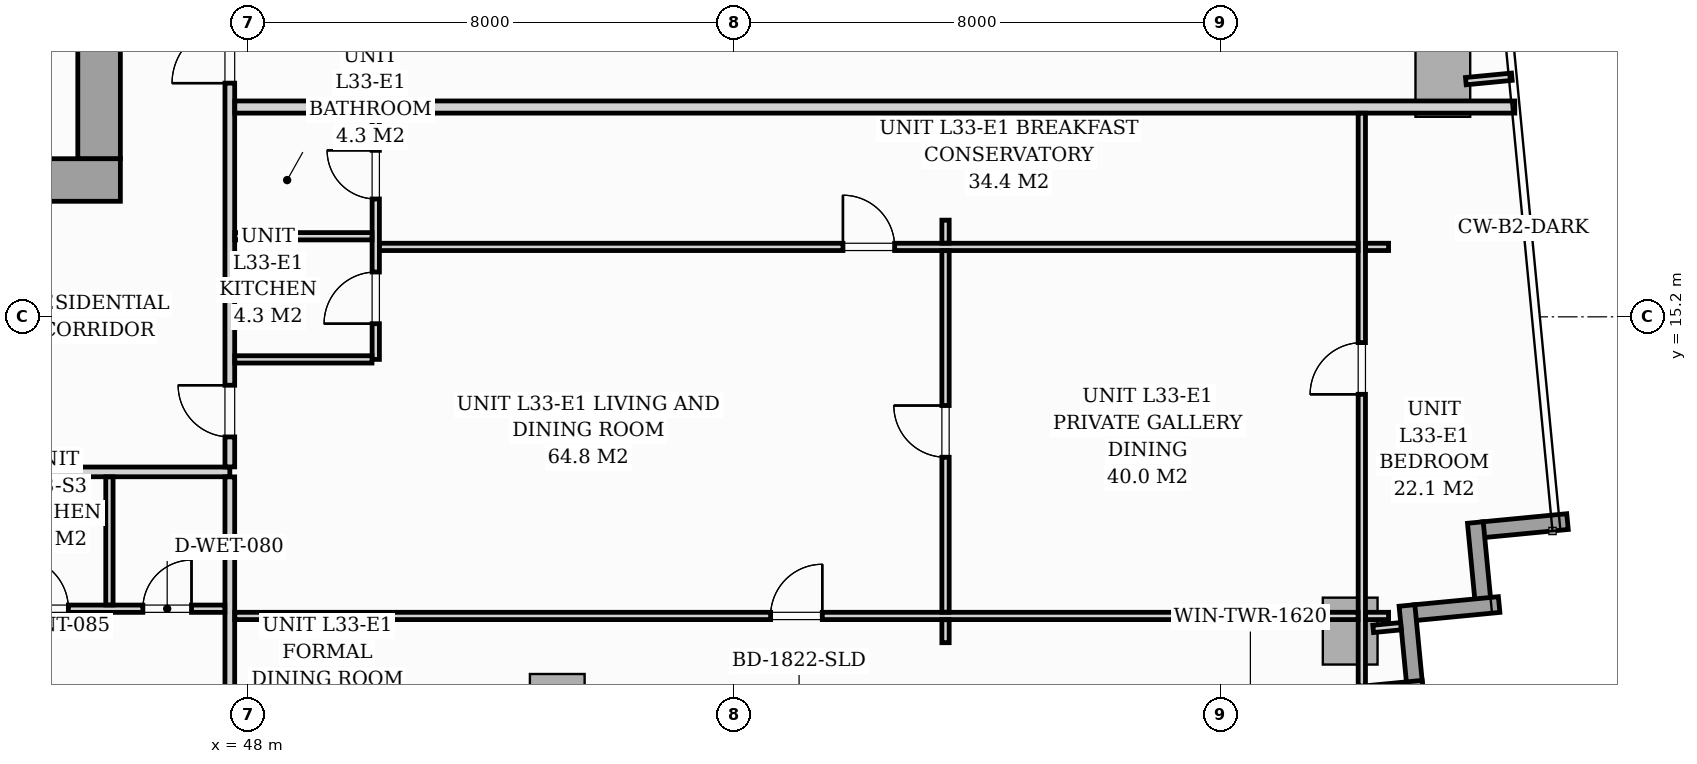
"""IFC4 building model, lengths in metres.
Left out: names, types, materials, properties, quantities, classifications, styles, units other than length and angle.
Written with IfcOpenShell. Run it as: python <this file> out.ifc"""

import sys

from ifc_helpers import new_model, si_unit, direction, frame, frame_2d, origin, origin_2d, place, context, subcontext, project, spatial, rectangle, i_section, extrude, source, transform, mapped, element, fill, save


model = new_model("IFC4")
c1 = context("Model", 3, precision=1e-05, world=origin(), true_north=direction((0.0, 1.0)))
c2 = subcontext(c1, "Body", "Model", "MODEL_VIEW")
j1 = project(units=[si_unit("LENGTHUNIT", "METRE"), si_unit("PLANEANGLEUNIT", "RADIAN")], contexts=[c1])
p1 = place(None, origin())
s1 = spatial("IfcSite", under=j1, at=p1, CompositionType="ELEMENT")
p2 = place(p1, origin())
s2 = spatial("IfcBuilding", under=s1, at=p2, CompositionType="ELEMENT")
p3 = place(p2, frame((0.0, 0.0, 116.2)))
s3 = spatial("IfcBuildingStorey", under=s2, at=p3, CompositionType="ELEMENT", Elevation=116.2)
m1 = source(origin(), c2, "Body", "SweptSolid", [
    extrude(i_section(OverallWidth=0.427, OverallDepth=0.483, WebThickness=0.051, FlangeThickness=0.082, FilletRadius=0.018, at=origin_2d()), origin(), (0.0, 0.0, 1.0), 3.196),
])
p4 = place(p3, frame((45.6, 17.4, 0.002), z_axis=(0.0, 0.0, 1.0), x_axis=(1.0, 0.0, 0.0)))
e1 = element("IfcColumn", 1, at=p4, inside=s3, PredefinedType="PILASTER", context=c2, shape_type="MappedRepresentation", body=[
    mapped(m1, transform((0.0, 0.0, 0.0), scale=1.0)),
])
m2 = source(origin(), c2, "Body", "SweptSolid", [
    extrude(rectangle(XDim=0.9, YDim=1.1, at=origin_2d()), origin(), (0.0, 0.0, 1.0), 3.194),
])
for number, where, z_axis, x_axis in (
    (2, (53.085, 8.776, 0.002), (0.0, 0.0, 1.0), (0.995, 0.096, 0.0)),
    (3, (66.125, 10.032, 0.002), (0.0, 0.0, 1.0), (0.995, 0.096, 0.0)),
    (4, (67.648, 19.039, 0.002), (0.0, 0.0, 1.0), (0.995, 0.096, 0.0)),
):
    element("IfcColumn", number, at=place(p3, frame(where, z_axis=z_axis, x_axis=x_axis)), inside=s3, PredefinedType="COLUMN", context=c2, shape_type="MappedRepresentation", body=[
        mapped(m2, transform((0.0, 0.0, 0.0), scale=1.0)),
    ])
for number, where, z_axis, x_axis in (
    (5, (69.698, 11.833, 0.0), (0.0, 0.0, 1.0), (-0.995, -0.096, 0.0)),
    (6, (68.183, 11.817, 0.0), (0.0, 0.0, 1.0), (0.096, -0.995, 0.0)),
):
    element("IfcWall", number, at=place(p3, frame(where, z_axis=z_axis, x_axis=x_axis)), inside=s3, PredefinedType="STANDARD", context=c2, shape_type="SweptSolid", body=[
        extrude(rectangle(XDim=1.395, YDim=0.26, at=frame_2d((0.697, 0.0))), origin(), (0.0, 0.0, 1.0), 2.9),
    ])
p5 = place(p3, frame((68.574, 10.469, 0.0), z_axis=(0.0, 0.0, 1.0), x_axis=(-0.99540774648, -0.095725744959, 0.0)))
e7 = element("IfcWall", 7, at=p5, inside=s3, PredefinedType="STANDARD", context=c2, shape_type="SweptSolid", body=[
    extrude(rectangle(XDim=1.395, YDim=0.26, at=frame_2d((0.698, 0.0))), origin(), (0.0, 0.0, 1.0), 2.9),
])
p6 = place(p3, frame((67.059, 10.453, 0.0), z_axis=(0.0, 0.0, 1.0), x_axis=(0.095915846097, -0.995389446633, 0.0)))
e8 = element("IfcWall", 8, at=p6, inside=s3, PredefinedType="STANDARD", context=c2, shape_type="SweptSolid", body=[
    extrude(rectangle(XDim=1.395, YDim=0.26, at=frame_2d((0.697, 0.0))), origin(), (0.0, 0.0, 1.0), 2.9),
])
p7 = place(p3, frame((67.32, 9.092, 0.0), z_axis=(0.0, 0.0, 1.0), x_axis=(-0.995396521236, -0.095842399342, 0.0)))
e9 = element("IfcWall", 9, at=p7, inside=s3, PredefinedType="STANDARD", context=c2, shape_type="SweptSolid", body=[
    extrude(rectangle(XDim=19.11, YDim=0.26, at=frame_2d((9.555, 0.0))), origin(), (0.0, 0.0, 1.0), 2.9),
])
p8 = place(p7, frame((9.406, 0.0, 0.0)))
e10 = element("IfcOpeningElement", 10, at=p8, cuts=e9, PredefinedType="OPENING", context=c2, shape_type="SweptSolid", body=[
    extrude(rectangle(XDim=1.8, YDim=2.06, at=frame_2d((0.9, 1.03))), frame((0.0, 0.14, 0.0), z_axis=(0.0, -1.0, 0.0), x_axis=(1.0, 0.0, 0.0)), (0.0, 0.0, 1.0), 0.28),
])
p9 = place(p7, frame((2.05, 0.0, 0.65)))
e11 = element("IfcOpeningElement", 11, at=p9, cuts=e9, PredefinedType="OPENING", context=c2, shape_type="SweptSolid", body=[
    extrude(rectangle(XDim=1.6, YDim=1.5, at=frame_2d((0.8, 0.75))), frame((0.0, 0.14, 0.0), z_axis=(0.0, -1.0, 0.0), x_axis=(1.0, 0.0, 0.0)), (0.0, 0.0, 1.0), 0.28),
])
p10 = place(p3, frame((26.1, 17.45, 0.0), z_axis=(0.0, 0.0, 1.0), x_axis=(1.0, 0.0, 0.0)))
e12 = element("IfcWall", 12, at=p10, inside=s3, PredefinedType="SHEAR", context=c2, shape_type="SweptSolid", body=[
    extrude(rectangle(XDim=19.8, YDim=0.7, at=frame_2d((9.9, 0.0))), origin(), (0.0, 0.0, 1.0), 3.2),
])
p11 = place(p10, frame((1.05, 0.0, 0.0)))
e13 = element("IfcOpeningElement", 13, at=p11, cuts=e12, PredefinedType="OPENING", context=c2, shape_type="SweptSolid", body=[
    extrude(rectangle(XDim=0.95, YDim=2.06, at=frame_2d((0.475, 1.03))), frame((0.0, 0.36, 0.0), z_axis=(0.0, -1.0, 0.0), x_axis=(1.0, 0.0, 0.0)), (0.0, 0.0, 1.0), 0.72),
])
p12 = place(p10, frame((9.48, 0.0, 0.0)))
e14 = element("IfcOpeningElement", 14, at=p12, cuts=e12, PredefinedType="OPENING", context=c2, shape_type="SweptSolid", body=[
    extrude(rectangle(XDim=0.85, YDim=2.0, at=frame_2d((0.425, 1.0))), frame((0.0, 0.36, 0.0), z_axis=(0.0, -1.0, 0.0), x_axis=(1.0, 0.0, 0.0)), (0.0, 0.0, 1.0), 0.72),
])
p13 = place(p10, frame((17.65, 0.0, 0.0)))
e15 = element("IfcOpeningElement", 15, at=p13, cuts=e12, PredefinedType="OPENING", context=c2, shape_type="SweptSolid", body=[
    extrude(rectangle(XDim=0.95, YDim=2.06, at=frame_2d((0.475, 1.03))), frame((0.0, 0.36, 0.0), z_axis=(0.0, -1.0, 0.0), x_axis=(1.0, 0.0, 0.0)), (0.0, 0.0, 1.0), 0.72),
])
p14 = place(p3, frame((45.55, 17.802, 0.0), z_axis=(0.0, 0.0, 1.0), x_axis=(0.0, 1.0, 0.0)))
e16 = element("IfcWall", 16, at=p14, inside=s3, PredefinedType="SHEAR", context=c2, shape_type="SweptSolid", body=[
    extrude(rectangle(XDim=5.796, YDim=0.7, at=frame_2d((2.898, 0.0))), origin(), (0.0, 0.0, 1.0), 3.2),
])
p15 = place(p3, frame((21.5, 12.65, 0.0), z_axis=(0.0, 0.0, 1.0), x_axis=(1.0, 0.0, 0.0)))
e17 = element("IfcWall", 17, at=p15, inside=s3, PredefinedType="PARTITIONING", context=c2, shape_type="SweptSolid", body=[
    extrude(rectangle(XDim=26.2, YDim=0.16, at=frame_2d((13.1, 0.0))), origin(), (0.0, 0.0, 1.0), 2.9),
])
p16 = place(p15, frame((5.927, 0.0, 0.0)))
e18 = element("IfcOpeningElement", 18, at=p16, cuts=e17, PredefinedType="OPENING", context=c2, shape_type="SweptSolid", body=[
    extrude(rectangle(XDim=0.95, YDim=2.06, at=frame_2d((0.475, 1.03))), frame((0.0, 0.09, 0.0), z_axis=(0.0, -1.0, 0.0), x_axis=(1.0, 0.0, 0.0)), (0.0, 0.0, 1.0), 0.18),
])
p17 = place(p15, frame((10.575, 0.0, 0.0)))
e19 = element("IfcOpeningElement", 19, at=p17, cuts=e17, PredefinedType="OPENING", context=c2, shape_type="SweptSolid", body=[
    extrude(rectangle(XDim=0.95, YDim=2.06, at=frame_2d((0.475, 1.03))), frame((0.0, 0.09, 0.0), z_axis=(0.0, -1.0, 0.0), x_axis=(1.0, 0.0, 0.0)), (0.0, 0.0, 1.0), 0.18),
])
p18 = place(p15, frame((19.322, 0.0, 0.0)))
e20 = element("IfcOpeningElement", 20, at=p18, cuts=e17, PredefinedType="OPENING", context=c2, shape_type="SweptSolid", body=[
    extrude(rectangle(XDim=0.95, YDim=2.06, at=frame_2d((0.475, 1.03))), frame((0.0, 0.09, 0.0), z_axis=(0.0, -1.0, 0.0), x_axis=(1.0, 0.0, 0.0)), (0.0, 0.0, 1.0), 0.18),
])
p19 = place(p3, frame((47.7, 7.153, 0.0), z_axis=(0.0, 0.0, 1.0), x_axis=(0.0, 1.0, 0.0)))
e21 = element("IfcWall", 21, at=p19, inside=s3, PredefinedType="PARTITIONING", context=c2, shape_type="SweptSolid", body=[
    extrude(rectangle(XDim=5.416, YDim=0.16, at=frame_2d((2.708, 0.0))), origin(), (0.0, 0.0, 1.0), 2.9),
])
p20 = place(p3, frame((47.7, 12.732, 0.0), z_axis=(0.0, 0.0, 1.0), x_axis=(0.0, 1.0, 0.0)))
e22 = element("IfcWall", 22, at=p20, inside=s3, PredefinedType="PARTITIONING", context=c2, shape_type="SweptSolid", body=[
    extrude(rectangle(XDim=7.918, YDim=0.16, at=frame_2d((3.959, 0.0))), origin(), (0.0, 0.0, 1.0), 2.9),
])
p21 = place(p20, frame((0.493, 0.0, 0.0)))
e23 = element("IfcOpeningElement", 23, at=p21, cuts=e22, PredefinedType="OPENING", context=c2, shape_type="SweptSolid", body=[
    extrude(rectangle(XDim=0.85, YDim=2.0, at=frame_2d((0.425, 1.0))), frame((0.0, 0.09, 0.0), z_axis=(0.0, -1.0, 0.0), x_axis=(1.0, 0.0, 0.0)), (0.0, 0.0, 1.0), 0.18),
])
p22 = place(p20, frame((6.311, 0.0, 0.0)))
e24 = element("IfcOpeningElement", 24, at=p22, cuts=e22, PredefinedType="OPENING", context=c2, shape_type="SweptSolid", body=[
    extrude(rectangle(XDim=0.95, YDim=2.06, at=frame_2d((0.475, 1.03))), frame((0.0, 0.09, 0.0), z_axis=(0.0, -1.0, 0.0), x_axis=(1.0, 0.0, 0.0)), (0.0, 0.0, 1.0), 0.18),
])
p23 = place(p3, frame((43.52, 10.4, 0.0), z_axis=(0.0, 0.0, 1.0), x_axis=(1.0, 0.0, 0.0)))
e25 = element("IfcWall", 25, at=p23, inside=s3, PredefinedType="PARTITIONING", context=c2, shape_type="SweptSolid", body=[
    extrude(rectangle(XDim=4.098, YDim=0.12, at=frame_2d((2.049, 0.0))), origin(), (0.0, 0.0, 1.0), 2.9),
])
p24 = place(p23, frame((0.675, 0.0, 0.0)))
e26 = element("IfcOpeningElement", 26, at=p24, cuts=e25, PredefinedType="OPENING", context=c2, shape_type="SweptSolid", body=[
    extrude(rectangle(XDim=0.85, YDim=2.05, at=frame_2d((0.425, 1.025))), frame((0.0, 0.07, 0.0), z_axis=(0.0, -1.0, 0.0), x_axis=(1.0, 0.0, 0.0)), (0.0, 0.0, 1.0), 0.14),
])
p25 = place(p23, frame((2.75, 0.0, 0.0)))
e27 = element("IfcOpeningElement", 27, at=p25, cuts=e25, PredefinedType="OPENING", context=c2, shape_type="SweptSolid", body=[
    extrude(rectangle(XDim=0.8, YDim=2.02, at=frame_2d((0.4, 1.01))), frame((0.0, 0.07, 0.0), z_axis=(0.0, -1.0, 0.0), x_axis=(1.0, 0.0, 0.0)), (0.0, 0.0, 1.0), 0.14),
])
p26 = place(p3, frame((45.72, 10.462, 0.0), z_axis=(0.0, 0.0, 1.0), x_axis=(0.0, 1.0, 0.0)))
e28 = element("IfcWall", 28, at=p26, inside=s3, PredefinedType="PARTITIONING", context=c2, shape_type="SweptSolid", body=[
    extrude(rectangle(XDim=2.106, YDim=0.12, at=frame_2d((1.053, 0.0))), origin(), (0.0, 0.0, 1.0), 2.9),
])
p27 = place(p3, frame((47.782, 18.65, 0.0), z_axis=(0.0, 0.0, 1.0), x_axis=(1.0, 0.0, 0.0)))
e29 = element("IfcWall", 29, at=p27, inside=s3, PredefinedType="PARTITIONING", context=c2, shape_type="SweptSolid", body=[
    extrude(rectangle(XDim=21.049, YDim=0.2, at=frame_2d((10.525, 0.0))), origin(), (0.0, 0.0, 1.0), 2.023),
])
p28 = place(p3, frame((50.1, 14.5, 0.0), z_axis=(0.0, 0.0, 1.0), x_axis=(0.0, 1.0, 0.0)))
e30 = element("IfcWall", 30, at=p28, inside=s3, PredefinedType="PARTITIONING", context=c2, shape_type="SweptSolid", body=[
    extrude(rectangle(XDim=4.048, YDim=0.12, at=frame_2d((2.024, 0.0))), origin(), (0.0, 0.0, 1.0), 2.9),
])
p29 = place(p28, frame((0.587, 0.0, 0.0)))
e31 = element("IfcOpeningElement", 31, at=p29, cuts=e30, PredefinedType="OPENING", context=c2, shape_type="SweptSolid", body=[
    extrude(rectangle(XDim=0.85, YDim=2.05, at=frame_2d((0.425, 1.025))), frame((0.0, 0.07, 0.0), z_axis=(0.0, -1.0, 0.0), x_axis=(1.0, 0.0, 0.0)), (0.0, 0.0, 1.0), 0.14),
])
p30 = place(p28, frame((2.638, 0.0, 0.0)))
e32 = element("IfcOpeningElement", 32, at=p30, cuts=e30, PredefinedType="OPENING", context=c2, shape_type="SweptSolid", body=[
    extrude(rectangle(XDim=0.8, YDim=2.0, at=frame_2d((0.4, 1.0))), frame((0.0, 0.07, 0.0), z_axis=(0.0, -1.0, 0.0), x_axis=(1.0, 0.0, 0.0)), (0.0, 0.0, 1.0), 0.14),
])
for number, where, z_axis, x_axis in (
    (33, (47.782, 16.525, 0.0), (0.0, 0.0, 1.0), (1.0, 0.0, 0.0)),
    (34, (47.782, 14.5, 0.0), (0.0, 0.0, 1.0), (1.0, 0.0, 0.0)),
):
    element("IfcWall", number, at=place(p3, frame(where, z_axis=z_axis, x_axis=x_axis)), inside=s3, PredefinedType="PARTITIONING", context=c2, shape_type="SweptSolid", body=[
        extrude(rectangle(XDim=2.256, YDim=0.12, at=frame_2d((1.128, 0.0))), origin(), (0.0, 0.0, 1.0), 2.9),
    ])
p31 = place(p3, frame((66.316, 9.128, 0.0), z_axis=(0.0, 0.0, 1.0), x_axis=(0.0, 1.0, 0.0)))
e35 = element("IfcWall", 35, at=p31, inside=s3, PredefinedType="PARTITIONING", context=c2, shape_type="SweptSolid", body=[
    extrude(rectangle(XDim=9.42, YDim=0.12, at=frame_2d((4.71, 0.0))), origin(), (0.0, 0.0, 1.0), 2.27),
])
p32 = place(p31, frame((4.798, 0.0, 0.0)))
e36 = element("IfcOpeningElement", 36, at=p32, cuts=e35, PredefinedType="OPENING", context=c2, shape_type="SweptSolid", body=[
    extrude(rectangle(XDim=0.85, YDim=2.05, at=frame_2d((0.425, 1.025))), frame((0.0, 0.07, 0.0), z_axis=(0.0, -1.0, 0.0), x_axis=(1.0, 0.0, 0.0)), (0.0, 0.0, 1.0), 0.14),
])
p33 = place(p3, frame((47.782, 10.281, 0.0), z_axis=(0.0, 0.0, 1.0), x_axis=(1.0, 0.0, 0.0)))
e37 = element("IfcWall", 37, at=p33, inside=s3, PredefinedType="PARTITIONING", context=c2, shape_type="SweptSolid", body=[
    extrude(rectangle(XDim=18.472, YDim=0.12, at=frame_2d((9.236, 0.0))), origin(), (0.0, 0.0, 1.0), 2.9),
])
p34 = place(p33, frame((8.811, 0.0, 0.0)))
e38 = element("IfcOpeningElement", 38, at=p34, cuts=e37, PredefinedType="OPENING", context=c2, shape_type="SweptSolid", body=[
    extrude(rectangle(XDim=0.85, YDim=2.05, at=frame_2d((0.425, 1.025))), frame((0.0, 0.07, 0.0), z_axis=(0.0, -1.0, 0.0), x_axis=(1.0, 0.0, 0.0)), (0.0, 0.0, 1.0), 0.14),
])
p35 = place(p3, frame((66.378, 10.281, 0.0), z_axis=(0.0, 0.0, 1.0), x_axis=(1.0, 0.0, 0.0)))
e39 = element("IfcWall", 39, at=p35, inside=s3, PredefinedType="PARTITIONING", context=c2, shape_type="SweptSolid", body=[
    extrude(rectangle(XDim=0.378, YDim=0.12, at=frame_2d((0.189, 0.0))), origin(), (0.0, 0.0, 1.0), 2.9),
])
p36 = place(p3, frame((50.162, 16.35, 0.0), z_axis=(0.0, 0.0, 1.0), x_axis=(1.0, 0.0, 0.0)))
e40 = element("IfcWall", 40, at=p36, inside=s3, PredefinedType="PARTITIONING", context=c2, shape_type="SweptSolid", body=[
    extrude(rectangle(XDim=16.092, YDim=0.12, at=frame_2d((8.046, 0.0))), origin(), (0.0, 0.0, 1.0), 2.9),
])
p37 = place(p36, frame((7.621, 0.0, 0.0)))
e41 = element("IfcOpeningElement", 41, at=p37, cuts=e40, PredefinedType="OPENING", context=c2, shape_type="SweptSolid", body=[
    extrude(rectangle(XDim=0.85, YDim=2.05, at=frame_2d((0.425, 1.025))), frame((0.0, 0.07, 0.0), z_axis=(0.0, -1.0, 0.0), x_axis=(1.0, 0.0, 0.0)), (0.0, 0.0, 1.0), 0.14),
])
p38 = place(p3, frame((66.378, 16.35, 0.0), z_axis=(0.0, 0.0, 1.0), x_axis=(1.0, 0.0, 0.0)))
e42 = element("IfcWall", 42, at=p38, inside=s3, PredefinedType="PARTITIONING", context=c2, shape_type="SweptSolid", body=[
    extrude(rectangle(XDim=0.378, YDim=0.12, at=frame_2d((0.189, 0.0))), origin(), (0.0, 0.0, 1.0), 2.9),
])
p39 = place(p3, frame((59.47, 9.841, 0.0), z_axis=(0.0, 0.0, 1.0), x_axis=(0.0, 1.0, 0.0)))
e43 = element("IfcWall", 43, at=p39, inside=s3, PredefinedType="PARTITIONING", context=c2, shape_type="SweptSolid", body=[
    extrude(rectangle(XDim=0.378, YDim=0.12, at=frame_2d((0.189, 0.0))), origin(), (0.0, 0.0, 1.0), 2.9),
])
p40 = place(p3, frame((59.47, 10.343, 0.0), z_axis=(0.0, 0.0, 1.0), x_axis=(0.0, 1.0, 0.0)))
e44 = element("IfcWall", 44, at=p40, inside=s3, PredefinedType="PARTITIONING", context=c2, shape_type="SweptSolid", body=[
    extrude(rectangle(XDim=5.945, YDim=0.12, at=frame_2d((2.973, 0.0))), origin(), (0.0, 0.0, 1.0), 2.9),
])
p41 = place(p40, frame((2.548, 0.0, 0.0)))
e45 = element("IfcOpeningElement", 45, at=p41, cuts=e44, PredefinedType="OPENING", context=c2, shape_type="SweptSolid", body=[
    extrude(rectangle(XDim=0.85, YDim=2.05, at=frame_2d((0.425, 1.025))), frame((0.0, 0.07, 0.0), z_axis=(0.0, -1.0, 0.0), x_axis=(1.0, 0.0, 0.0)), (0.0, 0.0, 1.0), 0.14),
])
p42 = place(p3, frame((59.47, 16.412, 0.0), z_axis=(0.0, 0.0, 1.0), x_axis=(0.0, 1.0, 0.0)))
e46 = element("IfcWall", 46, at=p42, inside=s3, PredefinedType="PARTITIONING", context=c2, shape_type="SweptSolid", body=[
    extrude(rectangle(XDim=0.378, YDim=0.12, at=frame_2d((0.189, 0.0))), origin(), (0.0, 0.0, 1.0), 2.9),
])
p43 = place(p3, frame((66.503, 10.068, 0.0), z_axis=(0.0, 0.0, 1.0), x_axis=(0.995389482415, 0.095915474751, 0.0)))
e47 = element("IfcWall", 47, at=p43, inside=s3, PredefinedType="PARTITIONING", context=c2, shape_type="SweptSolid", body=[
    extrude(rectangle(XDim=0.458, YDim=0.12, at=frame_2d((0.229, 0.0))), origin(), (0.0, 0.0, 1.0), 2.9),
])
p44 = place(p3, frame((68.027, 19.076, 0.0), z_axis=(0.0, 0.0, 1.0), x_axis=(0.995377786728, 0.096036772582, 0.0)))
e48 = element("IfcWall", 48, at=p44, inside=s3, PredefinedType="PARTITIONING", context=c2, shape_type="SweptSolid", body=[
    extrude(rectangle(XDim=0.76, YDim=0.12, at=frame_2d((0.38, 0.0))), origin(), (0.0, 0.0, 1.0), 2.9),
])
m3 = source(origin(), c2, "Body", "SweptSolid", [
    extrude(rectangle(XDim=0.85, YDim=2.05, at=frame_2d((0.425, 1.025))), frame((0.0, 0.025, 0.0), z_axis=(0.0, -1.0, 0.0), x_axis=(1.0, 0.0, 0.0)), (0.0, 0.0, 1.0), 0.05),
])
p45 = place(p24, origin())
e49 = element("IfcDoor", 49, at=p45, inside=s3, OperationType="SINGLE_SWING_LEFT", PredefinedType="DOOR", context=c2, shape_type="MappedRepresentation", body=[
    mapped(m3, transform((0.0, 0.0, 0.0), scale=1.0)),
])
fill(e26, e49)
m4 = source(origin(), c2, "Body", "SweptSolid", [
    extrude(rectangle(XDim=0.8, YDim=2.02, at=frame_2d((0.4, 1.01))), frame((0.0, 0.025, 0.0), z_axis=(0.0, -1.0, 0.0), x_axis=(1.0, 0.0, 0.0)), (0.0, 0.0, 1.0), 0.05),
])
p46 = place(p25, origin())
e50 = element("IfcDoor", 50, at=p46, inside=s3, OperationType="SINGLE_SWING_RIGHT", PredefinedType="DOOR", context=c2, shape_type="MappedRepresentation", body=[
    mapped(m4, transform((0.0, 0.0, 0.0), scale=1.0)),
])
fill(e27, e50)
m5 = source(origin(), c2, "Body", "SweptSolid", [
    extrude(rectangle(XDim=0.85, YDim=2.0, at=frame_2d((0.425, 1.0))), frame((0.0, 0.025, 0.0), z_axis=(0.0, -1.0, 0.0), x_axis=(1.0, 0.0, 0.0)), (0.0, 0.0, 1.0), 0.05),
])
p47 = place(p21, origin())
e51 = element("IfcDoor", 51, at=p47, inside=s3, OperationType="SINGLE_SWING_RIGHT", PredefinedType="DOOR", context=c2, shape_type="MappedRepresentation", body=[
    mapped(m5, transform((0.0, 0.0, 0.0), scale=1.0)),
])
fill(e23, e51)
p48 = place(p29, origin())
e52 = element("IfcDoor", 52, at=p48, inside=s3, OperationType="SINGLE_SWING_LEFT", PredefinedType="DOOR", context=c2, shape_type="MappedRepresentation", body=[
    mapped(m3, transform((0.0, 0.0, 0.0), scale=1.0)),
])
fill(e31, e52)
m6 = source(origin(), c2, "Body", "SweptSolid", [
    extrude(rectangle(XDim=0.8, YDim=2.0, at=frame_2d((0.4, 1.0))), frame((0.0, 0.025, 0.0), z_axis=(0.0, -1.0, 0.0), x_axis=(1.0, 0.0, 0.0)), (0.0, 0.0, 1.0), 0.05),
])
p49 = place(p30, origin())
e53 = element("IfcDoor", 53, at=p49, inside=s3, OperationType="SINGLE_SWING_RIGHT", PredefinedType="DOOR", context=c2, shape_type="MappedRepresentation", body=[
    mapped(m6, transform((0.0, 0.0, 0.0), scale=1.0)),
])
fill(e32, e53)
p50 = place(p32, origin())
e54 = element("IfcDoor", 54, at=p50, inside=s3, OperationType="SINGLE_SWING_LEFT", PredefinedType="DOOR", context=c2, shape_type="MappedRepresentation", body=[
    mapped(m3, transform((0.0, 0.0, 0.0), scale=1.0)),
])
fill(e36, e54)
p51 = place(p34, origin())
e55 = element("IfcDoor", 55, at=p51, inside=s3, OperationType="SINGLE_SWING_RIGHT", PredefinedType="DOOR", context=c2, shape_type="MappedRepresentation", body=[
    mapped(m3, transform((0.0, 0.0, 0.0), scale=1.0)),
])
fill(e38, e55)
p52 = place(p37, origin())
e56 = element("IfcDoor", 56, at=p52, inside=s3, OperationType="SINGLE_SWING_LEFT", PredefinedType="DOOR", context=c2, shape_type="MappedRepresentation", body=[
    mapped(m3, transform((0.0, 0.0, 0.0), scale=1.0)),
])
fill(e41, e56)
p53 = place(p41, origin())
e57 = element("IfcDoor", 57, at=p53, inside=s3, OperationType="SINGLE_SWING_RIGHT", PredefinedType="DOOR", context=c2, shape_type="MappedRepresentation", body=[
    mapped(m3, transform((0.0, 0.0, 0.0), scale=1.0)),
])
fill(e45, e57)
m7 = source(origin(), c2, "Body", "SweptSolid", [
    extrude(rectangle(XDim=0.95, YDim=2.06, at=frame_2d((0.475, 1.03))), frame((0.0, 0.025, 0.0), z_axis=(0.0, -1.0, 0.0), x_axis=(1.0, 0.0, 0.0)), (0.0, 0.0, 1.0), 0.05),
])
p54 = place(p22, origin())
e58 = element("IfcDoor", 58, at=p54, inside=s3, OperationType="SINGLE_SWING_LEFT", PredefinedType="DOOR", context=c2, shape_type="MappedRepresentation", body=[
    mapped(m7, transform((0.0, 0.0, 0.0), scale=1.0)),
])
fill(e24, e58)
save(model, sys.argv[1])
